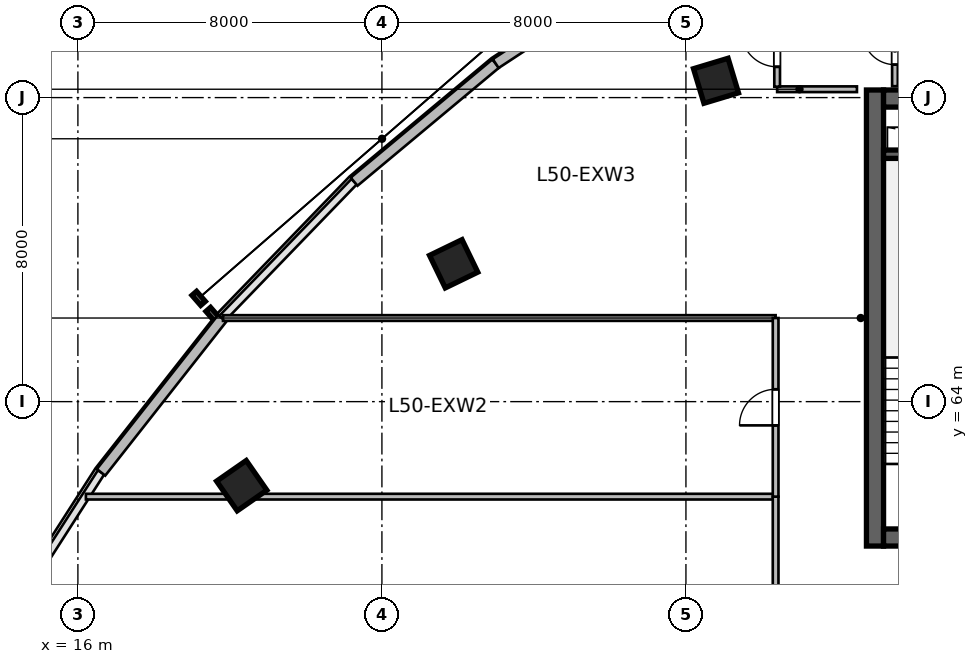
"""IFC4 building model, lengths in metres.
Left out: names, types, materials, properties, quantities, classifications, styles, units other than length and angle.
Written with IfcOpenShell. Run it as: python <this file> out.ifc"""

import sys

from ifc_helpers import new_model, si_unit, direction, frame, frame_2d, origin, origin_2d, place, context, subcontext, project, spatial, rectangle, extrude, source, transform, mapped, element, fill, save


model = new_model("IFC4")
c1 = context("Model", 3, precision=1e-05, world=origin(), true_north=direction((0.0, 1.0)))
c2 = subcontext(c1, "Body", "Model", "MODEL_VIEW")
j1 = project(units=[si_unit("LENGTHUNIT", "METRE"), si_unit("PLANEANGLEUNIT", "RADIAN")], contexts=[c1])
p1 = place(None, origin())
s1 = spatial("IfcSite", under=j1, at=p1, CompositionType="ELEMENT")
p2 = place(p1, origin())
s2 = spatial("IfcBuilding", under=s1, at=p2, CompositionType="ELEMENT")
p3 = place(p2, frame((0.0, 0.0, 207.9)))
s3 = spatial("IfcBuildingStorey", under=s2, at=p3, CompositionType="ELEMENT", Elevation=207.9)
m1 = source(origin(), c2, "Body", "SweptSolid", [
    extrude(rectangle(XDim=12.0, YDim=0.45, at=frame_2d((6.0, 0.0))), origin(), (0.0, 0.0, 1.0), 3.9),
])
p4 = place(p3, frame((36.975, 60.2, 0.0), z_axis=(0.0, 0.0, 1.0), x_axis=(0.0, 1.0, 0.0)))
e1 = element("IfcWall", 1, at=p4, inside=s3, PredefinedType="SHEAR", context=c2, shape_type="MappedRepresentation", body=[
    mapped(m1, transform((0.0, 0.0, 0.0), scale=1.0)),
])
m2 = source(origin(), c2, "Body", "SweptSolid", [
    extrude(rectangle(XDim=21.6, YDim=0.45, at=frame_2d((10.8, 0.0))), origin(), (0.0, 0.0, 1.0), 3.9),
])
p5 = place(p3, frame((37.2, 60.425, 0.0), z_axis=(0.0, 0.0, 1.0), x_axis=(1.0, 0.0, 0.0)))
e2 = element("IfcWall", 2, at=p5, inside=s3, PredefinedType="SHEAR", context=c2, shape_type="MappedRepresentation", body=[
    mapped(m2, transform((0.0, 0.0, 0.0), scale=1.0)),
])
p6 = place(p5, frame((1.1, 0.0, 0.0)))
e3 = element("IfcOpeningElement", 3, at=p6, cuts=e2, PredefinedType="OPENING", context=c2, shape_type="SweptSolid", body=[
    extrude(rectangle(XDim=1.15, YDim=2.15, at=frame_2d((0.575, 1.075))), frame((0.0, 0.235, 0.0), z_axis=(0.0, -1.0, 0.0), x_axis=(1.0, 0.0, 0.0)), (0.0, 0.0, 1.0), 0.47),
])
p7 = place(p5, frame((19.5, 0.0, 0.0)))
e4 = element("IfcOpeningElement", 4, at=p7, cuts=e2, PredefinedType="OPENING", context=c2, shape_type="SweptSolid", body=[
    extrude(rectangle(XDim=0.9, YDim=2.1, at=frame_2d((0.45, 1.05))), frame((0.0, 0.235, 0.0), z_axis=(0.0, -1.0, 0.0), x_axis=(1.0, 0.0, 0.0)), (0.0, 0.0, 1.0), 0.47),
])
p8 = place(p5, frame((12.02, 0.0, 0.0)))
e5 = element("IfcOpeningElement", 5, at=p8, cuts=e2, PredefinedType="OPENING", context=c2, shape_type="SweptSolid", body=[
    extrude(rectangle(XDim=1.6, YDim=2.15, at=frame_2d((0.8, 1.075))), frame((0.0, 0.235, 0.0), z_axis=(0.0, -1.0, 0.0), x_axis=(1.0, 0.0, 0.0)), (0.0, 0.0, 1.0), 0.47),
])
p9 = place(p3, frame((37.2, 71.975, 0.0), z_axis=(0.0, 0.0, 1.0), x_axis=(1.0, 0.0, 0.0)))
e6 = element("IfcWall", 6, at=p9, inside=s3, PredefinedType="SHEAR", context=c2, shape_type="MappedRepresentation", body=[
    mapped(m2, transform((0.0, 0.0, 0.0), scale=1.0)),
])
p10 = place(p9, frame((1.2, 0.0, 0.0)))
e7 = element("IfcOpeningElement", 7, at=p10, cuts=e6, PredefinedType="OPENING", context=c2, shape_type="SweptSolid", body=[
    extrude(rectangle(XDim=0.9, YDim=2.1, at=frame_2d((0.45, 1.05))), frame((0.0, 0.235, 0.0), z_axis=(0.0, -1.0, 0.0), x_axis=(1.0, 0.0, 0.0)), (0.0, 0.0, 1.0), 0.47),
])
p11 = place(p9, frame((14.7, 0.0, 0.0)))
e8 = element("IfcOpeningElement", 8, at=p11, cuts=e6, PredefinedType="OPENING", context=c2, shape_type="SweptSolid", body=[
    extrude(rectangle(XDim=1.2, YDim=2.15, at=frame_2d((0.6, 1.075))), frame((0.0, 0.235, 0.0), z_axis=(0.0, -1.0, 0.0), x_axis=(1.0, 0.0, 0.0)), (0.0, 0.0, 1.0), 0.47),
])
p12 = place(p9, frame((4.15, 0.0, 0.0)))
e9 = element("IfcOpeningElement", 9, at=p12, cuts=e6, PredefinedType="OPENING", context=c2, shape_type="SweptSolid", body=[
    extrude(rectangle(XDim=1.3, YDim=2.15, at=frame_2d((0.65, 1.075))), frame((0.0, 0.235, 0.0), z_axis=(0.0, -1.0, 0.0), x_axis=(1.0, 0.0, 0.0)), (0.0, 0.0, 1.0), 0.47),
])
p13 = place(p9, frame((6.76, 0.0, 0.0)))
e10 = element("IfcOpeningElement", 10, at=p13, cuts=e6, PredefinedType="OPENING", context=c2, shape_type="SweptSolid", body=[
    extrude(rectangle(XDim=0.85, YDim=2.1, at=frame_2d((0.425, 1.05))), frame((0.0, 0.235, 0.0), z_axis=(0.0, -1.0, 0.0), x_axis=(1.0, 0.0, 0.0)), (0.0, 0.0, 1.0), 0.47),
])
p14 = place(p9, frame((8.76, 0.0, 0.0)))
e11 = element("IfcOpeningElement", 11, at=p14, cuts=e6, PredefinedType="OPENING", context=c2, shape_type="SweptSolid", body=[
    extrude(rectangle(XDim=0.85, YDim=2.1, at=frame_2d((0.425, 1.05))), frame((0.0, 0.235, 0.0), z_axis=(0.0, -1.0, 0.0), x_axis=(1.0, 0.0, 0.0)), (0.0, 0.0, 1.0), 0.47),
])
p15 = place(p9, frame((10.725, 0.0, 0.0)))
e12 = element("IfcOpeningElement", 12, at=p15, cuts=e6, PredefinedType="OPENING", context=c2, shape_type="SweptSolid", body=[
    extrude(rectangle(XDim=0.85, YDim=2.1, at=frame_2d((0.425, 1.05))), frame((0.0, 0.235, 0.0), z_axis=(0.0, -1.0, 0.0), x_axis=(1.0, 0.0, 0.0)), (0.0, 0.0, 1.0), 0.47),
])
m3 = source(origin(), c2, "Body", "SweptSolid", [
    extrude(rectangle(XDim=3.27, YDim=0.22, at=frame_2d((1.635, 0.0))), origin(), (0.0, 0.0, 1.0), 3.9),
])
p16 = place(p3, frame((37.2, 70.51, 0.0), z_axis=(0.0, 0.0, 1.0), x_axis=(1.0, 0.0, 0.0)))
e13 = element("IfcWall", 13, at=p16, inside=s3, PredefinedType="SHEAR", context=c2, shape_type="MappedRepresentation", body=[
    mapped(m3, transform((0.0, 0.0, 0.0), scale=1.0)),
])
m4 = source(origin(), c2, "Body", "SweptSolid", [
    extrude(rectangle(XDim=0.95, YDim=0.95, at=origin_2d()), origin(), (0.0, 0.0, 1.0), 3.9),
])
for number, where, z_axis, x_axis in (
    (14, (20.311, 61.789, 0.0), (0.0, 0.0, 1.0), (-0.571, 0.821, 0.0)),
    (15, (25.888, 67.627, 0.0), (0.0, 0.0, 1.0), (-0.436, 0.9, 0.0)),
    (16, (32.791, 72.442, 0.0), (0.0, 0.0, 1.0), (-0.289, 0.957, 0.0)),
):
    element("IfcColumn", number, at=place(p3, frame(where, z_axis=z_axis, x_axis=x_axis)), inside=s3, PredefinedType="COLUMN", context=c2, shape_type="MappedRepresentation", body=[
        mapped(m4, transform((0.0, 0.0, 0.0), scale=1.0)),
    ])
m5 = source(origin(), c2, "Body", "SweptSolid", [
    extrude(rectangle(XDim=5.153, YDim=0.28, at=frame_2d((2.577, 0.0))), origin(), (0.0, 0.0, 1.0), 3.64),
])
p17 = place(p3, frame((16.609, 62.14, 0.0), z_axis=(0.0, 0.0, 1.0), x_axis=(0.618179283891, 0.786037132054, 0.0)))
e17 = element("IfcWall", 17, at=p17, inside=s3, PredefinedType="SOLIDWALL", context=c2, shape_type="MappedRepresentation", body=[
    mapped(m5, transform((0.0, 0.0, 0.0), scale=1.0)),
])
m6 = source(origin(), c2, "Body", "SweptSolid", [
    extrude(rectangle(XDim=4.852, YDim=0.28, at=frame_2d((2.426, 0.0))), origin(), (0.0, 0.0, 1.0), 3.64),
])
p18 = place(p3, frame((23.268, 69.788, 0.0), z_axis=(0.0, 0.0, 1.0), x_axis=(0.767936605821, 0.640525853843, 0.0)))
e18 = element("IfcWall", 18, at=p18, inside=s3, PredefinedType="SOLIDWALL", context=c2, shape_type="MappedRepresentation", body=[
    mapped(m6, transform((0.0, 0.0, 0.0), scale=1.0)),
])
m7 = source(origin(), c2, "Body", "SweptSolid", [
    extrude(rectangle(XDim=4.713, YDim=0.28, at=frame_2d((2.356, 0.0))), origin(), (0.0, 0.0, 1.0), 3.64),
])
p19 = place(p3, frame((26.994, 72.896, 0.0), z_axis=(0.0, 0.0, 1.0), x_axis=(0.835974386457, 0.548768462275, 0.0)))
e19 = element("IfcWall", 19, at=p19, inside=s3, PredefinedType="SOLIDWALL", context=c2, shape_type="MappedRepresentation", body=[
    mapped(m7, transform((0.0, 0.0, 0.0), scale=1.0)),
])
m8 = source(origin(), c2, "Body", "SweptSolid", [
    extrude(rectangle(XDim=2.1, YDim=0.15, at=frame_2d((1.05, 0.0))), origin(), (0.0, 0.0, 1.0), 3.64),
])
p20 = place(p3, frame((34.4, 72.22, 0.0), z_axis=(0.0, 0.0, 1.0), x_axis=(1.0, 0.0, 0.0)))
e20 = element("IfcWall", 20, at=p20, inside=s3, PredefinedType="PARTITIONING", context=c2, shape_type="MappedRepresentation", body=[
    mapped(m8, transform((0.0, 0.0, 0.0), scale=1.0)),
])
m9 = source(origin(), c2, "Body", "SweptSolid", [
    extrude(rectangle(XDim=1.995, YDim=0.15, at=frame_2d((0.998, 0.0))), origin(), (0.0, 0.0, 1.0), 3.64),
])
p21 = place(p3, frame((34.4, 72.288, 0.0), z_axis=(0.0, 0.0, 1.0), x_axis=(0.0, 1.0, 0.0)))
e21 = element("IfcWall", 21, at=p21, inside=s3, PredefinedType="PARTITIONING", context=c2, shape_type="MappedRepresentation", body=[
    mapped(m9, transform((0.0, 0.0, 0.0), scale=1.0)),
])
p22 = place(p21, frame((0.522, 0.0, 0.0)))
e22 = element("IfcOpeningElement", 22, at=p22, cuts=e21, PredefinedType="OPENING", context=c2, shape_type="SweptSolid", body=[
    extrude(rectangle(XDim=0.95, YDim=2.1, at=frame_2d((0.475, 1.05))), frame((0.0, 0.085, 0.0), z_axis=(0.0, -1.0, 0.0), x_axis=(1.0, 0.0, 0.0)), (0.0, 0.0, 1.0), 0.17),
])
m10 = source(origin(), c2, "Body", "SweptSolid", [
    extrude(rectangle(XDim=1.982, YDim=0.15, at=frame_2d((0.991, 0.0))), origin(), (0.0, 0.0, 1.0), 3.64),
])
p23 = place(p3, frame((37.5, 72.3, 0.0), z_axis=(0.0, 0.0, 1.0), x_axis=(0.0, 1.0, 0.0)))
e23 = element("IfcWall", 23, at=p23, inside=s3, PredefinedType="PARTITIONING", context=c2, shape_type="MappedRepresentation", body=[
    mapped(m10, transform((0.0, 0.0, 0.0), scale=1.0)),
])
p24 = place(p23, frame((0.566, 0.0, 0.0)))
e24 = element("IfcOpeningElement", 24, at=p24, cuts=e23, PredefinedType="OPENING", context=c2, shape_type="SweptSolid", body=[
    extrude(rectangle(XDim=0.85, YDim=2.1, at=frame_2d((0.425, 1.05))), frame((0.0, 0.085, 0.0), z_axis=(0.0, -1.0, 0.0), x_axis=(1.0, 0.0, 0.0)), (0.0, 0.0, 1.0), 0.17),
])
m11 = source(origin(), c2, "Body", "SweptSolid", [
    extrude(rectangle(XDim=18.15, YDim=0.15, at=frame_2d((9.075, 0.0))), origin(), (0.0, 0.0, 1.0), 3.64),
])
p25 = place(p3, frame((16.21, 61.5, 0.0), z_axis=(0.0, 0.0, 1.0), x_axis=(1.0, 0.0, 0.0)))
e25 = element("IfcWall", 25, at=p25, inside=s3, PredefinedType="PARTITIONING", context=c2, shape_type="MappedRepresentation", body=[
    mapped(m11, transform((0.0, 0.0, 0.0), scale=1.0)),
])
m12 = source(origin(), c2, "Body", "SweptSolid", [
    extrude(rectangle(XDim=3.54, YDim=0.15, at=frame_2d((1.77, 0.0))), origin(), (0.0, 0.0, 1.0), 3.64),
])
p26 = place(p3, frame((34.36, 57.96, 0.0), z_axis=(0.0, 0.0, 1.0), x_axis=(0.0, 1.0, 0.0)))
e26 = element("IfcWall", 26, at=p26, inside=s3, PredefinedType="PARTITIONING", context=c2, shape_type="MappedRepresentation", body=[
    mapped(m12, transform((0.0, 0.0, 0.0), scale=1.0)),
])
m13 = source(origin(), c2, "Body", "SweptSolid", [
    extrude(rectangle(XDim=14.542, YDim=0.15, at=frame_2d((7.271, 0.0))), origin(), (0.0, 0.0, 1.0), 3.64),
])
p27 = place(p3, frame((19.818, 66.2, 0.0), z_axis=(0.0, 0.0, 1.0), x_axis=(1.0, 0.0, 0.0)))
e27 = element("IfcWall", 27, at=p27, inside=s3, PredefinedType="PARTITIONING", context=c2, shape_type="MappedRepresentation", body=[
    mapped(m13, transform((0.0, 0.0, 0.0), scale=1.0)),
])
m14 = source(origin(), c2, "Body", "SweptSolid", [
    extrude(rectangle(XDim=4.7, YDim=0.15, at=frame_2d((2.35, 0.0))), origin(), (0.0, 0.0, 1.0), 3.64),
])
p28 = place(p3, frame((34.36, 61.5, 0.0), z_axis=(0.0, 0.0, 1.0), x_axis=(0.0, 1.0, 0.0)))
e28 = element("IfcWall", 28, at=p28, inside=s3, PredefinedType="PARTITIONING", context=c2, shape_type="MappedRepresentation", body=[
    mapped(m14, transform((0.0, 0.0, 0.0), scale=1.0)),
])
p29 = place(p28, frame((1.875, 0.0, 0.0)))
e29 = element("IfcOpeningElement", 29, at=p29, cuts=e28, PredefinedType="OPENING", context=c2, shape_type="SweptSolid", body=[
    extrude(rectangle(XDim=0.95, YDim=2.1, at=frame_2d((0.475, 1.05))), frame((0.0, 0.085, 0.0), z_axis=(0.0, -1.0, 0.0), x_axis=(1.0, 0.0, 0.0)), (0.0, 0.0, 1.0), 0.17),
])
m15 = source(origin(), c2, "Body", "SweptSolid", [
    extrude(rectangle(XDim=0.85, YDim=2.1, at=frame_2d((0.425, 1.05))), frame((0.0, 0.025, 0.0), z_axis=(0.0, -1.0, 0.0), x_axis=(1.0, 0.0, 0.0)), (0.0, 0.0, 1.0), 0.05),
])
p30 = place(p24, origin())
e30 = element("IfcDoor", 30, at=p30, inside=s3, OperationType="SINGLE_SWING_RIGHT", PredefinedType="DOOR", context=c2, shape_type="MappedRepresentation", body=[
    mapped(m15, transform((0.0, 0.0, 0.0), scale=1.0)),
])
fill(e24, e30)
m16 = source(origin(), c2, "Body", "SweptSolid", [
    extrude(rectangle(XDim=0.95, YDim=2.1, at=frame_2d((0.475, 1.05))), frame((0.0, 0.025, 0.0), z_axis=(0.0, -1.0, 0.0), x_axis=(1.0, 0.0, 0.0)), (0.0, 0.0, 1.0), 0.05),
])
p31 = place(p29, origin())
e31 = element("IfcDoor", 31, at=p31, inside=s3, OperationType="SINGLE_SWING_LEFT", PredefinedType="DOOR", context=c2, shape_type="MappedRepresentation", body=[
    mapped(m16, transform((0.0, 0.0, 0.0), scale=1.0)),
])
fill(e29, e31)
p32 = place(p22, origin())
e32 = element("IfcDoor", 32, at=p32, inside=s3, OperationType="SINGLE_SWING_RIGHT", PredefinedType="DOOR", context=c2, shape_type="MappedRepresentation", body=[
    mapped(m16, transform((0.0, 0.0, 0.0), scale=1.0)),
])
fill(e22, e32)
save(model, sys.argv[1])
